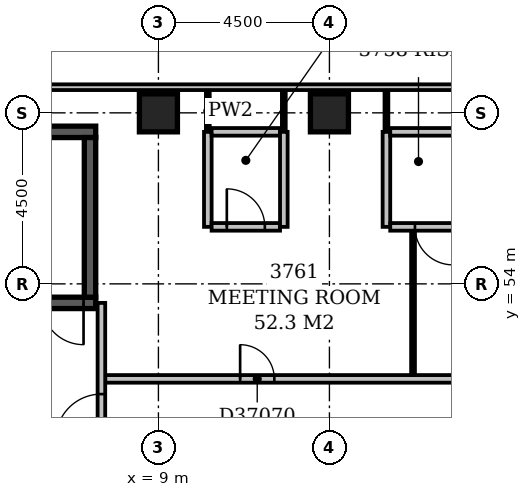
"""IFC4 building model, lengths in metres.
Left out: names, types, materials, properties, quantities, classifications, styles, units other than length and angle.
Written with IfcOpenShell. Run it as: python <this file> out.ifc"""

import sys

from ifc_helpers import new_model, si_unit, direction, frame, frame_2d, origin, origin_2d, place, context, subcontext, project, spatial, rectangle, extrude, element, fill, save


model = new_model("IFC4")
c1 = context("Model", 3, precision=1e-05, world=origin(), true_north=direction((0.0, 1.0)))
c2 = subcontext(c1, "Body", "Model", "MODEL_VIEW")
j1 = project(units=[si_unit("LENGTHUNIT", "METRE"), si_unit("PLANEANGLEUNIT", "RADIAN")], contexts=[c1])
p1 = place(None, origin())
s1 = spatial("IfcSite", under=j1, at=p1, CompositionType="ELEMENT")
p2 = place(p1, origin())
s2 = spatial("IfcBuilding", under=s1, at=p2, CompositionType="ELEMENT")
p3 = place(p2, frame((0.0, 0.0, 148.4)))
s3 = spatial("IfcBuildingStorey", under=s2, at=p3, CompositionType="ELEMENT", Elevation=148.4)
p4 = place(p3, frame((0.35, 53.5, -0.3), z_axis=(0.0, 0.0, 1.0), x_axis=(1.0, 0.0, 0.0)))
e1 = element("IfcWall", 1, at=p4, inside=s3, PredefinedType="SHEAR", context=c2, shape_type="SweptSolid", body=[
    extrude(rectangle(XDim=7.0, YDim=0.3, at=frame_2d((3.5, 0.0))), origin(), (0.0, 0.0, 1.0), 3.6),
])
p5 = place(p4, frame((5.58, 0.0, 0.3)))
e2 = element("IfcOpeningElement", 2, at=p5, cuts=e1, PredefinedType="OPENING", context=c2, shape_type="SweptSolid", body=[
    extrude(rectangle(XDim=1.1, YDim=2.1, at=frame_2d((0.55, 1.05))), frame((0.0, 0.162, 0.0), z_axis=(0.0, -1.0, 0.0), x_axis=(1.0, 0.0, 0.0)), (0.0, 0.0, 1.0), 0.324),
])
p6 = place(p3, frame((0.35, 58.0, -0.3), z_axis=(0.0, 0.0, 1.0), x_axis=(1.0, 0.0, 0.0)))
e3 = element("IfcWall", 3, at=p6, inside=s3, PredefinedType="SHEAR", context=c2, shape_type="SweptSolid", body=[
    extrude(rectangle(XDim=7.0, YDim=0.3, at=frame_2d((3.5, 0.0))), origin(), (0.0, 0.0, 1.0), 3.6),
])
p7 = place(p3, frame((7.2, 53.65, -0.3), z_axis=(0.0, 0.0, 1.0), x_axis=(0.0, 1.0, 0.0)))
e4 = element("IfcWall", 4, at=p7, inside=s3, PredefinedType="SHEAR", context=c2, shape_type="SweptSolid", body=[
    extrude(rectangle(XDim=4.2, YDim=0.3, at=frame_2d((2.1, 0.0))), origin(), (0.0, 0.0, 1.0), 3.6),
])
for number, where, z_axis, x_axis in (
    (5, (9.0, 58.5, -0.3), (0.0, 0.0, 1.0), (1.0, 0.0, 0.0)),
    (6, (13.5, 58.5, -0.3), (0.0, 0.0, 1.0), (1.0, 0.0, 0.0)),
):
    element("IfcColumn", number, at=place(p3, frame(where, z_axis=z_axis, x_axis=x_axis)), inside=s3, PredefinedType="COLUMN", context=c2, shape_type="SweptSolid", body=[
        extrude(rectangle(XDim=1.0, YDim=1.0, at=origin_2d()), origin(), (0.0, 0.0, 1.0), 3.6),
    ])
p8 = place(p3, frame((68.1, 59.175, 0.0), z_axis=(0.0, 0.0, 1.0), x_axis=(-1.0, 0.0, 0.0)))
e7 = element("IfcWall", 7, at=p8, inside=s3, PredefinedType="STANDARD", context=c2, shape_type="SweptSolid", body=[
    extrude(rectangle(XDim=68.85, YDim=0.15, at=frame_2d((34.425, 0.0))), origin(), (0.0, 0.0, 1.0), 2.7),
])
p9 = place(p8, frame((1.65, 0.0, 0.6)))
e8 = element("IfcOpeningElement", 8, at=p9, cuts=e7, PredefinedType="OPENING", context=c2, shape_type="SweptSolid", body=[
    extrude(rectangle(XDim=2.4, YDim=1.8, at=frame_2d((1.2, 0.9))), frame((0.0, 0.087, 0.0), z_axis=(0.0, -1.0, 0.0), x_axis=(1.0, 0.0, 0.0)), (0.0, 0.0, 1.0), 0.174),
])
p10 = place(p8, frame((7.347, 0.0, 0.6)))
e9 = element("IfcOpeningElement", 9, at=p10, cuts=e7, PredefinedType="OPENING", context=c2, shape_type="SweptSolid", body=[
    extrude(rectangle(XDim=1.5, YDim=1.8, at=frame_2d((0.75, 0.9))), frame((0.0, 0.087, 0.0), z_axis=(0.0, -1.0, 0.0), x_axis=(1.0, 0.0, 0.0)), (0.0, 0.0, 1.0), 0.174),
])
p11 = place(p8, frame((15.15, 0.0, 0.6)))
e10 = element("IfcOpeningElement", 10, at=p11, cuts=e7, PredefinedType="OPENING", context=c2, shape_type="SweptSolid", body=[
    extrude(rectangle(XDim=2.4, YDim=1.8, at=frame_2d((1.2, 0.9))), frame((0.0, 0.087, 0.0), z_axis=(0.0, -1.0, 0.0), x_axis=(1.0, 0.0, 0.0)), (0.0, 0.0, 1.0), 0.174),
])
p12 = place(p3, frame((7.5, 49.6, 0.0), z_axis=(0.0, 0.0, 1.0), x_axis=(0.0, 1.0, 0.0)))
e11 = element("IfcWall", 11, at=p12, inside=s3, PredefinedType="PARTITIONING", context=c2, shape_type="SweptSolid", body=[
    extrude(rectangle(XDim=3.9, YDim=0.2, at=frame_2d((1.95, 0.0))), origin(), (0.0, 0.0, 1.0), 3.3),
])
p13 = place(p12, frame((0.3, 0.0, 0.0)))
e12 = element("IfcOpeningElement", 12, at=p13, cuts=e11, PredefinedType="OPENING", context=c2, shape_type="SweptSolid", body=[
    extrude(rectangle(XDim=1.2, YDim=2.1, at=frame_2d((0.6, 1.05))), frame((0.0, 0.112, 0.0), z_axis=(0.0, -1.0, 0.0), x_axis=(1.0, 0.0, 0.0)), (0.0, 0.0, 1.0), 0.224),
])
p14 = place(p3, frame((7.6, 51.5, 0.0), z_axis=(0.0, 0.0, 1.0), x_axis=(1.0, 0.0, 0.0)))
e13 = element("IfcWall", 13, at=p14, inside=s3, PredefinedType="PARTITIONING", context=c2, shape_type="SweptSolid", body=[
    extrude(rectangle(XDim=15.3, YDim=0.2, at=frame_2d((7.65, 0.0))), origin(), (0.0, 0.0, 1.0), 3.3),
])
p15 = place(p14, frame((3.55, 0.0, 0.0)))
e14 = element("IfcOpeningElement", 14, at=p15, cuts=e13, PredefinedType="OPENING", context=c2, shape_type="SweptSolid", body=[
    extrude(rectangle(XDim=0.9, YDim=2.1, at=frame_2d((0.45, 1.05))), frame((0.0, 0.112, 0.0), z_axis=(0.0, -1.0, 0.0), x_axis=(1.0, 0.0, 0.0)), (0.0, 0.0, 1.0), 0.224),
])
p16 = place(p14, frame((11.3, 0.0, 0.0)))
e15 = element("IfcOpeningElement", 15, at=p16, cuts=e13, PredefinedType="OPENING", context=c2, shape_type="SweptSolid", body=[
    extrude(rectangle(XDim=0.9, YDim=2.1, at=frame_2d((0.45, 1.05))), frame((0.0, 0.112, 0.0), z_axis=(0.0, -1.0, 0.0), x_axis=(1.0, 0.0, 0.0)), (0.0, 0.0, 1.0), 0.224),
])
p17 = place(p3, frame((15.7, 51.6, 0.0), z_axis=(0.0, 0.0, 1.0), x_axis=(0.0, 1.0, 0.0)))
e16 = element("IfcWall", 16, at=p17, inside=s3, PredefinedType="PARTITIONING", context=c2, shape_type="SweptSolid", body=[
    extrude(rectangle(XDim=3.8, YDim=0.1, at=frame_2d((1.9, 0.0))), origin(), (0.0, 0.0, 1.0), 3.3),
])
p18 = place(p3, frame((10.3, 55.5, 0.0), z_axis=(0.0, 0.0, 1.0), x_axis=(0.0, 1.0, 0.0)))
e17 = element("IfcWall", 17, at=p18, inside=s3, PredefinedType="PARTITIONING", context=c2, shape_type="SweptSolid", body=[
    extrude(rectangle(XDim=2.5, YDim=0.2, at=frame_2d((1.25, 0.0))), origin(), (0.0, 0.0, 1.0), 3.3),
])
p19 = place(p3, frame((10.4, 55.5, 0.0), z_axis=(0.0, 0.0, 1.0), x_axis=(1.0, 0.0, 0.0)))
e18 = element("IfcWall", 18, at=p19, inside=s3, PredefinedType="PARTITIONING", context=c2, shape_type="SweptSolid", body=[
    extrude(rectangle(XDim=1.8, YDim=0.2, at=frame_2d((0.9, 0.0))), origin(), (0.0, 0.0, 1.0), 3.3),
])
p20 = place(p19, frame((0.4, 0.0, 0.0)))
e19 = element("IfcOpeningElement", 19, at=p20, cuts=e18, PredefinedType="OPENING", context=c2, shape_type="SweptSolid", body=[
    extrude(rectangle(XDim=1.0, YDim=2.1, at=frame_2d((0.5, 1.05))), frame((0.0, 0.112, 0.0), z_axis=(0.0, -1.0, 0.0), x_axis=(1.0, 0.0, 0.0)), (0.0, 0.0, 1.0), 0.224),
])
for number, where, z_axis, x_axis in (
    (20, (12.3, 55.5, 0.0), (0.0, 0.0, 1.0), (0.0, 1.0, 0.0)),
    (21, (15.0, 55.5, 0.0), (0.0, 0.0, 1.0), (0.0, 1.0, 0.0)),
):
    element("IfcWall", number, at=place(p3, frame(where, z_axis=z_axis, x_axis=x_axis)), inside=s3, PredefinedType="PARTITIONING", context=c2, shape_type="SweptSolid", body=[
        extrude(rectangle(XDim=2.5, YDim=0.2, at=frame_2d((1.25, 0.0))), origin(), (0.0, 0.0, 1.0), 3.3),
    ])
p21 = place(p3, frame((15.1, 55.5, 0.0), z_axis=(0.0, 0.0, 1.0), x_axis=(1.0, 0.0, 0.0)))
e22 = element("IfcWall", 22, at=p21, inside=s3, PredefinedType="PARTITIONING", context=c2, shape_type="SweptSolid", body=[
    extrude(rectangle(XDim=1.8, YDim=0.2, at=frame_2d((0.9, 0.0))), origin(), (0.0, 0.0, 1.0), 3.3),
])
p22 = place(p21, frame((0.65, 0.0, 0.0)))
e23 = element("IfcOpeningElement", 23, at=p22, cuts=e22, PredefinedType="OPENING", context=c2, shape_type="SweptSolid", body=[
    extrude(rectangle(XDim=1.0, YDim=2.1, at=frame_2d((0.5, 1.05))), frame((0.0, 0.112, 0.0), z_axis=(0.0, -1.0, 0.0), x_axis=(1.0, 0.0, 0.0)), (0.0, 0.0, 1.0), 0.224),
])
p23 = place(p3, frame((10.3, 58.0, 0.0), z_axis=(0.0, 0.0, 1.0), x_axis=(0.0, 1.0, 0.0)))
e24 = element("IfcWall", 24, at=p23, inside=s3, PredefinedType="PARTITIONING", context=c2, shape_type="SweptSolid", body=[
    extrude(rectangle(XDim=1.1, YDim=0.1, at=frame_2d((0.55, 0.0))), origin(), (0.0, 0.0, 1.0), 3.3),
])
p24 = place(p3, frame((10.4, 58.0, 0.0), z_axis=(0.0, 0.0, 1.0), x_axis=(1.0, 0.0, 0.0)))
e25 = element("IfcWall", 25, at=p24, inside=s3, PredefinedType="PARTITIONING", context=c2, shape_type="SweptSolid", body=[
    extrude(rectangle(XDim=1.8, YDim=0.2, at=frame_2d((0.9, 0.0))), origin(), (0.0, 0.0, 1.0), 3.3),
])
for number, where, z_axis, x_axis in (
    (26, (12.3, 58.0, 0.0), (0.0, 0.0, 1.0), (0.0, 1.0, 0.0)),
    (27, (15.0, 58.0, 0.0), (0.0, 0.0, 1.0), (0.0, 1.0, 0.0)),
):
    element("IfcWall", number, at=place(p3, frame(where, z_axis=z_axis, x_axis=x_axis)), inside=s3, PredefinedType="PARTITIONING", context=c2, shape_type="SweptSolid", body=[
        extrude(rectangle(XDim=1.1, YDim=0.1, at=frame_2d((0.55, 0.0))), origin(), (0.0, 0.0, 1.0), 3.3),
    ])
p25 = place(p3, frame((15.1, 58.0, 0.0), z_axis=(0.0, 0.0, 1.0), x_axis=(1.0, 0.0, 0.0)))
e28 = element("IfcWall", 28, at=p25, inside=s3, PredefinedType="PARTITIONING", context=c2, shape_type="SweptSolid", body=[
    extrude(rectangle(XDim=1.8, YDim=0.2, at=frame_2d((0.9, 0.0))), origin(), (0.0, 0.0, 1.0), 3.3),
])
p26 = place(p13, origin())
e29 = element("IfcDoor", 29, at=p26, inside=s3, OperationType="SINGLE_SWING_LEFT", PredefinedType="DOOR", context=c2, shape_type="SweptSolid", body=[
    extrude(rectangle(XDim=1.2, YDim=2.1, at=frame_2d((0.6, 1.05))), frame((0.0, 0.025, 0.0), z_axis=(0.0, -1.0, 0.0), x_axis=(1.0, 0.0, 0.0)), (0.0, 0.0, 1.0), 0.05),
])
fill(e12, e29)
p27 = place(p5, origin())
e30 = element("IfcDoor", 30, at=p27, inside=s3, OperationType="SINGLE_SWING_RIGHT", PredefinedType="DOOR", context=c2, shape_type="SweptSolid", body=[
    extrude(rectangle(XDim=1.1, YDim=2.1, at=frame_2d((0.55, 1.05))), frame((0.0, 0.025, 0.0), z_axis=(0.0, -1.0, 0.0), x_axis=(1.0, 0.0, 0.0)), (0.0, 0.0, 1.0), 0.05),
])
fill(e2, e30)
p28 = place(p15, origin())
e31 = element("IfcDoor", 31, at=p28, inside=s3, OperationType="SINGLE_SWING_LEFT", PredefinedType="DOOR", context=c2, shape_type="SweptSolid", body=[
    extrude(rectangle(XDim=0.9, YDim=2.1, at=frame_2d((0.45, 1.05))), frame((0.0, 0.025, 0.0), z_axis=(0.0, -1.0, 0.0), x_axis=(1.0, 0.0, 0.0)), (0.0, 0.0, 1.0), 0.05),
])
fill(e14, e31)
p29 = place(p20, origin())
e32 = element("IfcDoor", 32, at=p29, inside=s3, OperationType="SINGLE_SWING_LEFT", PredefinedType="DOOR", context=c2, shape_type="SweptSolid", body=[
    extrude(rectangle(XDim=1.0, YDim=2.1, at=frame_2d((0.5, 1.05))), frame((0.0, 0.025, 0.0), z_axis=(0.0, -1.0, 0.0), x_axis=(1.0, 0.0, 0.0)), (0.0, 0.0, 1.0), 0.05),
])
fill(e19, e32)
p30 = place(p22, origin())
e33 = element("IfcDoor", 33, at=p30, inside=s3, OperationType="SINGLE_SWING_RIGHT", PredefinedType="DOOR", context=c2, shape_type="SweptSolid", body=[
    extrude(rectangle(XDim=1.0, YDim=2.1, at=frame_2d((0.5, 1.05))), frame((0.0, 0.025, 0.0), z_axis=(0.0, -1.0, 0.0), x_axis=(1.0, 0.0, 0.0)), (0.0, 0.0, 1.0), 0.05),
])
fill(e23, e33)
save(model, sys.argv[1])
